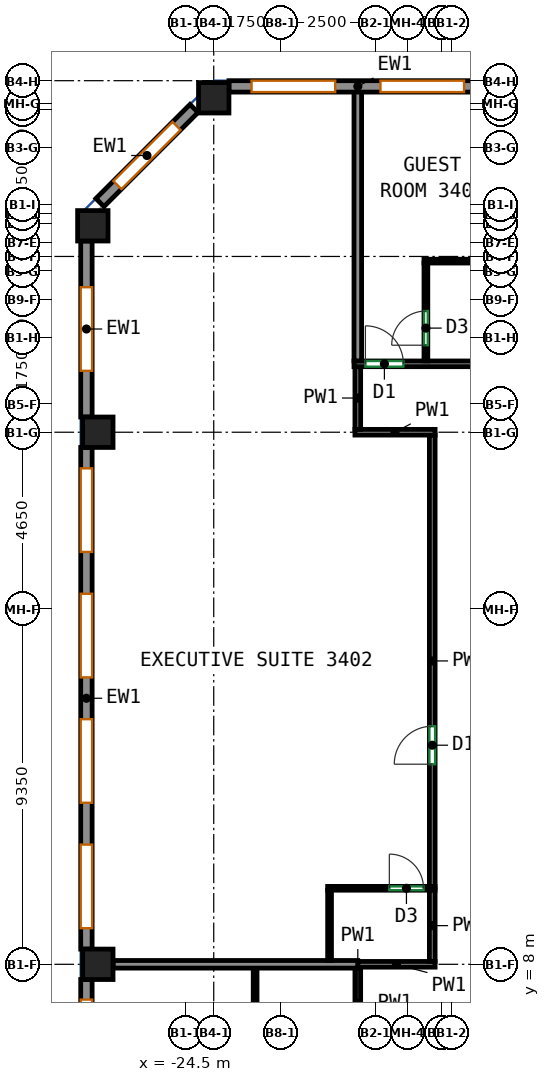
"""IFC4 building model, lengths in metres.
Left out: names, types, materials, properties, quantities, classifications, styles, units other than length and angle.
Written with IfcOpenShell. Run it as: python <this file> out.ifc"""

import sys

from ifc_helpers import new_model, si_unit, direction, frame, frame_2d, origin, origin_2d, place, context, subcontext, project, spatial, rectangle, extrude, source, transform, mapped, element, fill, save


model = new_model("IFC4")
c1 = context("Model", 3, precision=1e-05, world=origin(), true_north=direction((0.0, 1.0)))
c2 = subcontext(c1, "Body", "Model", "MODEL_VIEW")
j1 = project(units=[si_unit("LENGTHUNIT", "METRE"), si_unit("PLANEANGLEUNIT", "RADIAN")], contexts=[c1])
p1 = place(None, origin())
s1 = spatial("IfcSite", under=j1, at=p1, CompositionType="ELEMENT")
p2 = place(p1, origin())
s2 = spatial("IfcBuilding", under=s1, at=p2, CompositionType="ELEMENT")
p3 = place(p2, frame((0.0, 0.0, 150.7)))
s3 = spatial("IfcBuildingStorey", under=s2, at=p3, CompositionType="ELEMENT", Elevation=150.7)
m1 = source(origin(), c2, "Body", "SweptSolid", [
    extrude(rectangle(XDim=0.8, YDim=0.8, at=origin_2d()), origin(), (0.0, 0.0, 1.0), 3.12),
])
for number, where, z_axis, x_axis in (
    (1, (-26.932, 27.432, 0.0), (0.0, 0.0, 1.0), (1.0, 0.0, 0.0)),
    (2, (-26.8, 8.0, 0.0), (0.0, 0.0, 1.0), (1.0, 0.0, 0.0)),
    (3, (-26.8, 22.0, 0.0), (0.0, 0.0, 1.0), (1.0, 0.0, 0.0)),
    (4, (-23.75, 30.8, 0.0), (0.0, 0.0, 1.0), (1.0, 0.0, 0.0)),
):
    element("IfcColumn", number, at=place(p3, frame(where, z_axis=z_axis, x_axis=x_axis)), inside=s3, PredefinedType="COLUMN", context=c2, shape_type="MappedRepresentation", body=[
        mapped(m1, transform((0.0, 0.0, 0.0))),
    ])
m2 = source(origin(), c2, "Body", "SweptSolid", [
    extrude(rectangle(XDim=6.783, YDim=0.3, at=frame_2d((3.392, 0.0))), origin(), (0.0, 0.0, 1.0), 3.12),
])
p4 = place(p3, frame((-16.567, 31.1, 0.0), z_axis=(0.0, 0.0, 1.0), x_axis=(-1.0, 0.0, 0.0)))
e5 = element("IfcWall", 5, at=p4, inside=s3, PredefinedType="SOLIDWALL", context=c2, shape_type="MappedRepresentation", body=[
    mapped(m2, transform((0.0, 0.0, 0.0))),
])
p5 = place(p4, frame((0.596, 0.0, 0.85)))
e6 = element("IfcOpeningElement", 6, at=p5, cuts=e5, PredefinedType="OPENING", context=c2, shape_type="SweptSolid", body=[
    extrude(rectangle(XDim=2.2, YDim=1.95, at=frame_2d((1.1, 0.975))), frame((0.0, 0.16, 0.0), z_axis=(0.0, -1.0, 0.0), x_axis=(1.0, 0.0, 0.0)), (0.0, 0.0, 1.0), 0.32),
])
p6 = place(p4, frame((3.988, 0.0, 0.85)))
e7 = element("IfcOpeningElement", 7, at=p6, cuts=e5, PredefinedType="OPENING", context=c2, shape_type="SweptSolid", body=[
    extrude(rectangle(XDim=2.2, YDim=1.95, at=frame_2d((1.1, 0.975))), frame((0.0, 0.16, 0.0), z_axis=(0.0, -1.0, 0.0), x_axis=(1.0, 0.0, 0.0)), (0.0, 0.0, 1.0), 0.32),
])
m3 = source(origin(), c2, "Body", "SweptSolid", [
    extrude(rectangle(XDim=3.5, YDim=0.3, at=frame_2d((1.75, 0.0))), origin(), (0.0, 0.0, 1.0), 3.12),
])
p7 = place(p3, frame((-24.269, 30.519, 0.0), z_axis=(0.0, 0.0, 1.0), x_axis=(-0.707141656123, -0.70707190453, 0.0)))
e8 = element("IfcWall", 8, at=p7, inside=s3, PredefinedType="SOLIDWALL", context=c2, shape_type="MappedRepresentation", body=[
    mapped(m3, transform((0.0, 0.0, 0.0))),
])
p8 = place(p7, frame((0.65, 0.0, 0.85)))
e9 = element("IfcOpeningElement", 9, at=p8, cuts=e8, PredefinedType="OPENING", context=c2, shape_type="SweptSolid", body=[
    extrude(rectangle(XDim=2.2, YDim=1.95, at=frame_2d((1.1, 0.975))), frame((0.0, 0.16, 0.0), z_axis=(0.0, -1.0, 0.0), x_axis=(1.0, 0.0, 0.0)), (0.0, 0.0, 1.0), 0.32),
])
m4 = source(origin(), c2, "Body", "SweptSolid", [
    extrude(rectangle(XDim=4.632, YDim=0.3, at=frame_2d((2.316, 0.0))), origin(), (0.0, 0.0, 1.0), 3.12),
])
p9 = place(p3, frame((-27.1, 27.032, 0.0), z_axis=(0.0, 0.0, 1.0), x_axis=(0.0, -1.0, 0.0)))
e10 = element("IfcWall", 10, at=p9, inside=s3, PredefinedType="SOLIDWALL", context=c2, shape_type="MappedRepresentation", body=[
    mapped(m4, transform((0.0, 0.0, 0.0))),
])
p10 = place(p9, frame((1.216, 0.0, 0.85)))
e11 = element("IfcOpeningElement", 11, at=p10, cuts=e10, PredefinedType="OPENING", context=c2, shape_type="SweptSolid", body=[
    extrude(rectangle(XDim=2.2, YDim=1.95, at=frame_2d((1.1, 0.975))), frame((0.0, 0.16, 0.0), z_axis=(0.0, -1.0, 0.0), x_axis=(1.0, 0.0, 0.0)), (0.0, 0.0, 1.0), 0.32),
])
m5 = source(origin(), c2, "Body", "SweptSolid", [
    extrude(rectangle(XDim=13.2, YDim=0.3, at=frame_2d((6.6, 0.0))), origin(), (0.0, 0.0, 1.0), 3.12),
])
p11 = place(p3, frame((-27.1, 21.6, 0.0), z_axis=(0.0, 0.0, 1.0), x_axis=(0.0, -1.0, 0.0)))
e12 = element("IfcWall", 12, at=p11, inside=s3, PredefinedType="SOLIDWALL", context=c2, shape_type="MappedRepresentation", body=[
    mapped(m5, transform((0.0, 0.0, 0.0))),
])
p12 = place(p11, frame((0.55, 0.0, 0.85)))
e13 = element("IfcOpeningElement", 13, at=p12, cuts=e12, PredefinedType="OPENING", context=c2, shape_type="SweptSolid", body=[
    extrude(rectangle(XDim=2.2, YDim=1.95, at=frame_2d((1.1, 0.975))), frame((0.0, 0.16, 0.0), z_axis=(0.0, -1.0, 0.0), x_axis=(1.0, 0.0, 0.0)), (0.0, 0.0, 1.0), 0.32),
])
p13 = place(p11, frame((3.85, 0.0, 0.85)))
e14 = element("IfcOpeningElement", 14, at=p13, cuts=e12, PredefinedType="OPENING", context=c2, shape_type="SweptSolid", body=[
    extrude(rectangle(XDim=2.2, YDim=1.95, at=frame_2d((1.1, 0.975))), frame((0.0, 0.16, 0.0), z_axis=(0.0, -1.0, 0.0), x_axis=(1.0, 0.0, 0.0)), (0.0, 0.0, 1.0), 0.32),
])
p14 = place(p11, frame((7.15, 0.0, 0.85)))
e15 = element("IfcOpeningElement", 15, at=p14, cuts=e12, PredefinedType="OPENING", context=c2, shape_type="SweptSolid", body=[
    extrude(rectangle(XDim=2.2, YDim=1.95, at=frame_2d((1.1, 0.975))), frame((0.0, 0.16, 0.0), z_axis=(0.0, -1.0, 0.0), x_axis=(1.0, 0.0, 0.0)), (0.0, 0.0, 1.0), 0.32),
])
p15 = place(p11, frame((10.45, 0.0, 0.85)))
e16 = element("IfcOpeningElement", 16, at=p15, cuts=e12, PredefinedType="OPENING", context=c2, shape_type="SweptSolid", body=[
    extrude(rectangle(XDim=2.2, YDim=1.95, at=frame_2d((1.1, 0.975))), frame((0.0, 0.16, 0.0), z_axis=(0.0, -1.0, 0.0), x_axis=(1.0, 0.0, 0.0)), (0.0, 0.0, 1.0), 0.32),
])
m6 = source(origin(), c2, "Body", "SweptSolid", [
    extrude(rectangle(XDim=6.513, YDim=0.3, at=frame_2d((3.256, 0.0))), origin(), (0.0, 0.0, 1.0), 3.12),
])
p16 = place(p3, frame((-27.1, 7.6, 0.0), z_axis=(0.0, 0.0, 1.0), x_axis=(0.0, -1.0, 0.0)))
e17 = element("IfcWall", 17, at=p16, inside=s3, PredefinedType="SOLIDWALL", context=c2, shape_type="MappedRepresentation", body=[
    mapped(m6, transform((0.0, 0.0, 0.0))),
])
p17 = place(p16, frame((0.528, 0.0, 0.85)))
e18 = element("IfcOpeningElement", 18, at=p17, cuts=e17, PredefinedType="OPENING", context=c2, shape_type="SweptSolid", body=[
    extrude(rectangle(XDim=2.2, YDim=1.95, at=frame_2d((1.1, 0.975))), frame((0.0, 0.16, 0.0), z_axis=(0.0, -1.0, 0.0), x_axis=(1.0, 0.0, 0.0)), (0.0, 0.0, 1.0), 0.32),
])
p18 = place(p16, frame((3.784, 0.0, 0.85)))
e19 = element("IfcOpeningElement", 19, at=p18, cuts=e17, PredefinedType="OPENING", context=c2, shape_type="SweptSolid", body=[
    extrude(rectangle(XDim=2.2, YDim=1.95, at=frame_2d((1.1, 0.975))), frame((0.0, 0.16, 0.0), z_axis=(0.0, -1.0, 0.0), x_axis=(1.0, 0.0, 0.0)), (0.0, 0.0, 1.0), 0.32),
])
p19 = place(p3, frame((-19.959, 6.04, 0.0), z_axis=(0.0, 0.0, 1.0), x_axis=(0.0, 1.0, 0.0)))
e20 = element("IfcWall", 20, at=p19, inside=s3, PredefinedType="PARTITIONING", context=c2, shape_type="SweptSolid", body=[
    extrude(rectangle(XDim=1.86, YDim=0.15, at=frame_2d((0.93, 0.0))), origin(), (0.0, 0.0, 1.0), 3.12),
])
p20 = place(p3, frame((-18.0, 10.04, 0.0), z_axis=(0.0, 0.0, 1.0), x_axis=(0.0, 1.0, 0.0)))
e21 = element("IfcWall", 21, at=p20, inside=s3, PredefinedType="PARTITIONING", context=c2, shape_type="SweptSolid", body=[
    extrude(rectangle(XDim=11.885, YDim=0.15, at=frame_2d((5.942, 0.0))), origin(), (0.0, 0.0, 1.0), 3.12),
])
p21 = place(p20, frame((3.225, 0.0, 0.0)))
e22 = element("IfcOpeningElement", 22, at=p21, cuts=e21, PredefinedType="OPENING", context=c2, shape_type="SweptSolid", body=[
    extrude(rectangle(XDim=1.0, YDim=2.1, at=frame_2d((0.5, 1.05))), frame((0.0, 0.085, 0.0), z_axis=(0.0, -1.0, 0.0), x_axis=(1.0, 0.0, 0.0)), (0.0, 0.0, 1.0), 0.17),
])
p22 = place(p3, frame((-20.034, 22.0, 0.0), z_axis=(0.0, 0.0, 1.0), x_axis=(1.0, 0.0, 0.0)))
e23 = element("IfcWall", 23, at=p22, inside=s3, PredefinedType="PARTITIONING", context=c2, shape_type="SweptSolid", body=[
    extrude(rectangle(XDim=2.109, YDim=0.15, at=frame_2d((1.054, 0.0))), origin(), (0.0, 0.0, 1.0), 3.12),
])
p23 = place(p3, frame((-19.959, 22.075, 0.0), z_axis=(0.0, 0.0, 1.0), x_axis=(0.0, 1.0, 0.0)))
e24 = element("IfcWall", 24, at=p23, inside=s3, PredefinedType="PARTITIONING", context=c2, shape_type="SweptSolid", body=[
    extrude(rectangle(XDim=1.65, YDim=0.15, at=frame_2d((0.825, 0.0))), origin(), (0.0, 0.0, 1.0), 3.12),
])
p24 = place(p3, frame((-17.925, 8.0, 0.0), z_axis=(0.0, 0.0, 1.0), x_axis=(-1.0, 0.0, 0.0)))
e25 = element("IfcWall", 25, at=p24, inside=s3, PredefinedType="PARTITIONING", context=c2, shape_type="SweptSolid", body=[
    extrude(rectangle(XDim=2.034, YDim=0.15, at=frame_2d((1.017, 0.0))), origin(), (0.0, 0.0, 1.0), 3.12),
])
p25 = place(p3, frame((-18.0, 8.075, 0.0), z_axis=(0.0, 0.0, 1.0), x_axis=(0.0, 1.0, 0.0)))
e26 = element("IfcWall", 26, at=p25, inside=s3, PredefinedType="PARTITIONING", context=c2, shape_type="SweptSolid", body=[
    extrude(rectangle(XDim=1.885, YDim=0.15, at=frame_2d((0.942, 0.0))), origin(), (0.0, 0.0, 1.0), 3.12),
])
p26 = place(p3, frame((-20.059, 23.8, 0.0), z_axis=(0.0, 0.0, 1.0), x_axis=(1.0, 0.0, 0.0)))
e27 = element("IfcWall", 27, at=p26, inside=s3, PredefinedType="PARTITIONING", context=c2, shape_type="SweptSolid", body=[
    extrude(rectangle(XDim=41.909, YDim=0.15, at=frame_2d((20.955, 0.0))), origin(), (0.0, 0.0, 1.0), 3.12),
])
p27 = place(p26, frame((0.3, 0.0, 0.0)))
e28 = element("IfcOpeningElement", 28, at=p27, cuts=e27, PredefinedType="OPENING", context=c2, shape_type="SweptSolid", body=[
    extrude(rectangle(XDim=1.0, YDim=2.1, at=frame_2d((0.5, 1.05))), frame((0.0, 0.085, 0.0), z_axis=(0.0, -1.0, 0.0), x_axis=(1.0, 0.0, 0.0)), (0.0, 0.0, 1.0), 0.17),
])
p28 = place(p26, frame((6.391, 0.0, 0.0)))
e29 = element("IfcOpeningElement", 29, at=p28, cuts=e27, PredefinedType="OPENING", context=c2, shape_type="SweptSolid", body=[
    extrude(rectangle(XDim=1.0, YDim=2.1, at=frame_2d((0.5, 1.05))), frame((0.0, 0.085, 0.0), z_axis=(0.0, -1.0, 0.0), x_axis=(1.0, 0.0, 0.0)), (0.0, 0.0, 1.0), 0.17),
])
p29 = place(p26, frame((8.183, 0.0, 0.0)))
e30 = element("IfcOpeningElement", 30, at=p29, cuts=e27, PredefinedType="OPENING", context=c2, shape_type="SweptSolid", body=[
    extrude(rectangle(XDim=1.0, YDim=2.1, at=frame_2d((0.5, 1.05))), frame((0.0, 0.085, 0.0), z_axis=(0.0, -1.0, 0.0), x_axis=(1.0, 0.0, 0.0)), (0.0, 0.0, 1.0), 0.17),
])
p30 = place(p26, frame((13.872, 0.0, 0.0)))
e31 = element("IfcOpeningElement", 31, at=p30, cuts=e27, PredefinedType="OPENING", context=c2, shape_type="SweptSolid", body=[
    extrude(rectangle(XDim=1.0, YDim=2.1, at=frame_2d((0.5, 1.05))), frame((0.0, 0.085, 0.0), z_axis=(0.0, -1.0, 0.0), x_axis=(1.0, 0.0, 0.0)), (0.0, 0.0, 1.0), 0.17),
])
p31 = place(p26, frame((15.457, 0.0, 0.0)))
e32 = element("IfcOpeningElement", 32, at=p31, cuts=e27, PredefinedType="OPENING", context=c2, shape_type="SweptSolid", body=[
    extrude(rectangle(XDim=1.0, YDim=2.1, at=frame_2d((0.5, 1.05))), frame((0.0, 0.085, 0.0), z_axis=(0.0, -1.0, 0.0), x_axis=(1.0, 0.0, 0.0)), (0.0, 0.0, 1.0), 0.17),
])
p32 = place(p26, frame((21.199, 0.0, 0.0)))
e33 = element("IfcOpeningElement", 33, at=p32, cuts=e27, PredefinedType="OPENING", context=c2, shape_type="SweptSolid", body=[
    extrude(rectangle(XDim=1.0, YDim=2.1, at=frame_2d((0.5, 1.05))), frame((0.0, 0.085, 0.0), z_axis=(0.0, -1.0, 0.0), x_axis=(1.0, 0.0, 0.0)), (0.0, 0.0, 1.0), 0.17),
])
p33 = place(p26, frame((23.212, 0.0, 0.0)))
e34 = element("IfcOpeningElement", 34, at=p33, cuts=e27, PredefinedType="OPENING", context=c2, shape_type="SweptSolid", body=[
    extrude(rectangle(XDim=1.0, YDim=2.1, at=frame_2d((0.5, 1.05))), frame((0.0, 0.085, 0.0), z_axis=(0.0, -1.0, 0.0), x_axis=(1.0, 0.0, 0.0)), (0.0, 0.0, 1.0), 0.17),
])
p34 = place(p26, frame((28.832, 0.0, 0.0)))
e35 = element("IfcOpeningElement", 35, at=p34, cuts=e27, PredefinedType="OPENING", context=c2, shape_type="SweptSolid", body=[
    extrude(rectangle(XDim=1.0, YDim=2.1, at=frame_2d((0.5, 1.05))), frame((0.0, 0.085, 0.0), z_axis=(0.0, -1.0, 0.0), x_axis=(1.0, 0.0, 0.0)), (0.0, 0.0, 1.0), 0.17),
])
p35 = place(p26, frame((30.83, 0.0, 0.0)))
e36 = element("IfcOpeningElement", 36, at=p35, cuts=e27, PredefinedType="OPENING", context=c2, shape_type="SweptSolid", body=[
    extrude(rectangle(XDim=1.0, YDim=2.1, at=frame_2d((0.5, 1.05))), frame((0.0, 0.085, 0.0), z_axis=(0.0, -1.0, 0.0), x_axis=(1.0, 0.0, 0.0)), (0.0, 0.0, 1.0), 0.17),
])
p36 = place(p26, frame((36.519, 0.0, 0.0)))
e37 = element("IfcOpeningElement", 37, at=p36, cuts=e27, PredefinedType="OPENING", context=c2, shape_type="SweptSolid", body=[
    extrude(rectangle(XDim=1.0, YDim=2.1, at=frame_2d((0.5, 1.05))), frame((0.0, 0.085, 0.0), z_axis=(0.0, -1.0, 0.0), x_axis=(1.0, 0.0, 0.0)), (0.0, 0.0, 1.0), 0.17),
])
p37 = place(p26, frame((38.311, 0.0, 0.0)))
e38 = element("IfcOpeningElement", 38, at=p37, cuts=e27, PredefinedType="OPENING", context=c2, shape_type="SweptSolid", body=[
    extrude(rectangle(XDim=1.0, YDim=2.1, at=frame_2d((0.5, 1.05))), frame((0.0, 0.085, 0.0), z_axis=(0.0, -1.0, 0.0), x_axis=(1.0, 0.0, 0.0)), (0.0, 0.0, 1.0), 0.17),
])
p38 = place(p3, frame((-22.661, 6.05, 0.0), z_axis=(0.0, 0.0, 1.0), x_axis=(0.0, 1.0, 0.0)))
e39 = element("IfcWall", 39, at=p38, inside=s3, PredefinedType="PARTITIONING", context=c2, shape_type="SweptSolid", body=[
    extrude(rectangle(XDim=1.85, YDim=0.1, at=frame_2d((0.925, 0.0))), origin(), (0.0, 0.0, 1.0), 3.12),
])
p39 = place(p3, frame((-26.4, 8.0, 0.0), z_axis=(0.0, 0.0, 1.0), x_axis=(1.0, 0.0, 0.0)))
e40 = element("IfcWall", 40, at=p39, inside=s3, PredefinedType="PARTITIONING", context=c2, shape_type="SweptSolid", body=[
    extrude(rectangle(XDim=6.439, YDim=0.2, at=frame_2d((3.219, 0.0))), origin(), (0.0, 0.0, 1.0), 3.12),
])
p40 = place(p3, frame((-20.752, 10.0, 0.0), z_axis=(0.0, 0.0, 1.0), x_axis=(1.0, 0.0, 0.0)))
e41 = element("IfcWall", 41, at=p40, inside=s3, PredefinedType="PARTITIONING", context=c2, shape_type="SweptSolid", body=[
    extrude(rectangle(XDim=2.825, YDim=0.1, at=frame_2d((1.413, 0.0))), origin(), (0.0, 0.0, 1.0), 3.12),
])
p41 = place(p40, frame((1.623, 0.0, 0.0)))
e42 = element("IfcOpeningElement", 42, at=p41, cuts=e41, PredefinedType="OPENING", context=c2, shape_type="SweptSolid", body=[
    extrude(rectangle(XDim=0.9, YDim=2.1, at=frame_2d((0.45, 1.05))), frame((0.0, 0.06, 0.0), z_axis=(0.0, -1.0, 0.0), x_axis=(1.0, 0.0, 0.0)), (0.0, 0.0, 1.0), 0.12),
])
p42 = place(p3, frame((-20.702, 8.1, 0.0), z_axis=(0.0, 0.0, 1.0), x_axis=(0.0, 1.0, 0.0)))
e43 = element("IfcWall", 43, at=p42, inside=s3, PredefinedType="PARTITIONING", context=c2, shape_type="SweptSolid", body=[
    extrude(rectangle(XDim=1.85, YDim=0.1, at=frame_2d((0.925, 0.0))), origin(), (0.0, 0.0, 1.0), 3.12),
])
p43 = place(p3, frame((-19.959, 23.877, 0.0), z_axis=(0.0, 0.0, 1.0), x_axis=(0.0, 1.0, 0.0)))
e44 = element("IfcWall", 44, at=p43, inside=s3, PredefinedType="PARTITIONING", context=c2, shape_type="SweptSolid", body=[
    extrude(rectangle(XDim=7.123, YDim=0.2, at=frame_2d((3.562, 0.0))), origin(), (0.0, 0.0, 1.0), 3.12),
])
p44 = place(p3, frame((-18.217, 26.502, 0.0), z_axis=(0.0, 0.0, 1.0), x_axis=(1.0, 0.0, 0.0)))
e45 = element("IfcWall", 45, at=p44, inside=s3, PredefinedType="PARTITIONING", context=c2, shape_type="SweptSolid", body=[
    extrude(rectangle(XDim=1.5, YDim=0.1, at=frame_2d((0.75, 0.0))), origin(), (0.0, 0.0, 1.0), 3.12),
])
p45 = place(p3, frame((-18.167, 23.877, 0.0), z_axis=(0.0, 0.0, 1.0), x_axis=(0.0, 1.0, 0.0)))
e46 = element("IfcWall", 46, at=p45, inside=s3, PredefinedType="PARTITIONING", context=c2, shape_type="SweptSolid", body=[
    extrude(rectangle(XDim=2.575, YDim=0.1, at=frame_2d((1.288, 0.0))), origin(), (0.0, 0.0, 1.0), 3.12),
])
p46 = place(p45, frame((0.413, 0.0, 0.0)))
e47 = element("IfcOpeningElement", 47, at=p46, cuts=e46, PredefinedType="OPENING", context=c2, shape_type="SweptSolid", body=[
    extrude(rectangle(XDim=0.9, YDim=2.1, at=frame_2d((0.45, 1.05))), frame((0.0, 0.06, 0.0), z_axis=(0.0, -1.0, 0.0), x_axis=(1.0, 0.0, 0.0)), (0.0, 0.0, 1.0), 0.12),
])
p47 = place(p5, origin())
e48 = element("IfcWindow", 48, at=p47, inside=s3, PartitioningType="SINGLE_PANEL", PredefinedType="WINDOW", context=c2, shape_type="SweptSolid", body=[
    extrude(rectangle(XDim=2.2, YDim=1.95, at=frame_2d((1.1, 0.975))), frame((0.0, 0.03, 0.0), z_axis=(0.0, -1.0, 0.0), x_axis=(1.0, 0.0, 0.0)), (0.0, 0.0, 1.0), 0.06),
])
fill(e6, e48)
p48 = place(p6, origin())
e49 = element("IfcWindow", 49, at=p48, inside=s3, PartitioningType="SINGLE_PANEL", PredefinedType="WINDOW", context=c2, shape_type="SweptSolid", body=[
    extrude(rectangle(XDim=2.2, YDim=1.95, at=frame_2d((1.1, 0.975))), frame((0.0, 0.03, 0.0), z_axis=(0.0, -1.0, 0.0), x_axis=(1.0, 0.0, 0.0)), (0.0, 0.0, 1.0), 0.06),
])
fill(e7, e49)
p49 = place(p8, origin())
e50 = element("IfcWindow", 50, at=p49, inside=s3, PartitioningType="SINGLE_PANEL", PredefinedType="WINDOW", context=c2, shape_type="SweptSolid", body=[
    extrude(rectangle(XDim=2.2, YDim=1.95, at=frame_2d((1.1, 0.975))), frame((0.0, 0.03, 0.0), z_axis=(0.0, -1.0, 0.0), x_axis=(1.0, 0.0, 0.0)), (0.0, 0.0, 1.0), 0.06),
])
fill(e9, e50)
p50 = place(p10, origin())
e51 = element("IfcWindow", 51, at=p50, inside=s3, PartitioningType="SINGLE_PANEL", PredefinedType="WINDOW", context=c2, shape_type="SweptSolid", body=[
    extrude(rectangle(XDim=2.2, YDim=1.95, at=frame_2d((1.1, 0.975))), frame((0.0, 0.03, 0.0), z_axis=(0.0, -1.0, 0.0), x_axis=(1.0, 0.0, 0.0)), (0.0, 0.0, 1.0), 0.06),
])
fill(e11, e51)
p51 = place(p12, origin())
e52 = element("IfcWindow", 52, at=p51, inside=s3, PartitioningType="SINGLE_PANEL", PredefinedType="WINDOW", context=c2, shape_type="SweptSolid", body=[
    extrude(rectangle(XDim=2.2, YDim=1.95, at=frame_2d((1.1, 0.975))), frame((0.0, 0.03, 0.0), z_axis=(0.0, -1.0, 0.0), x_axis=(1.0, 0.0, 0.0)), (0.0, 0.0, 1.0), 0.06),
])
fill(e13, e52)
p52 = place(p13, origin())
e53 = element("IfcWindow", 53, at=p52, inside=s3, PartitioningType="SINGLE_PANEL", PredefinedType="WINDOW", context=c2, shape_type="SweptSolid", body=[
    extrude(rectangle(XDim=2.2, YDim=1.95, at=frame_2d((1.1, 0.975))), frame((0.0, 0.03, 0.0), z_axis=(0.0, -1.0, 0.0), x_axis=(1.0, 0.0, 0.0)), (0.0, 0.0, 1.0), 0.06),
])
fill(e14, e53)
p53 = place(p14, origin())
e54 = element("IfcWindow", 54, at=p53, inside=s3, PartitioningType="SINGLE_PANEL", PredefinedType="WINDOW", context=c2, shape_type="SweptSolid", body=[
    extrude(rectangle(XDim=2.2, YDim=1.95, at=frame_2d((1.1, 0.975))), frame((0.0, 0.03, 0.0), z_axis=(0.0, -1.0, 0.0), x_axis=(1.0, 0.0, 0.0)), (0.0, 0.0, 1.0), 0.06),
])
fill(e15, e54)
p54 = place(p15, origin())
e55 = element("IfcWindow", 55, at=p54, inside=s3, PartitioningType="SINGLE_PANEL", PredefinedType="WINDOW", context=c2, shape_type="SweptSolid", body=[
    extrude(rectangle(XDim=2.2, YDim=1.95, at=frame_2d((1.1, 0.975))), frame((0.0, 0.03, 0.0), z_axis=(0.0, -1.0, 0.0), x_axis=(1.0, 0.0, 0.0)), (0.0, 0.0, 1.0), 0.06),
])
fill(e16, e55)
p55 = place(p17, origin())
e56 = element("IfcWindow", 56, at=p55, inside=s3, PartitioningType="SINGLE_PANEL", PredefinedType="WINDOW", context=c2, shape_type="SweptSolid", body=[
    extrude(rectangle(XDim=2.2, YDim=1.95, at=frame_2d((1.1, 0.975))), frame((0.0, 0.03, 0.0), z_axis=(0.0, -1.0, 0.0), x_axis=(1.0, 0.0, 0.0)), (0.0, 0.0, 1.0), 0.06),
])
fill(e18, e56)
p56 = place(p41, origin())
e57 = element("IfcDoor", 57, at=p56, inside=s3, OperationType="SINGLE_SWING_LEFT", PredefinedType="DOOR", context=c2, shape_type="SweptSolid", body=[
    extrude(rectangle(XDim=0.9, YDim=2.1, at=frame_2d((0.45, 1.05))), frame((0.0, 0.025, 0.0), z_axis=(0.0, -1.0, 0.0), x_axis=(1.0, 0.0, 0.0)), (0.0, 0.0, 1.0), 0.05),
])
fill(e42, e57)
p57 = place(p21, origin())
e58 = element("IfcDoor", 58, at=p57, inside=s3, OperationType="SINGLE_SWING_LEFT", PredefinedType="DOOR", context=c2, shape_type="SweptSolid", body=[
    extrude(rectangle(XDim=1.0, YDim=2.1, at=frame_2d((0.5, 1.05))), frame((0.0, 0.025, 0.0), z_axis=(0.0, -1.0, 0.0), x_axis=(1.0, 0.0, 0.0)), (0.0, 0.0, 1.0), 0.05),
])
fill(e22, e58)
p58 = place(p27, origin())
e59 = element("IfcDoor", 59, at=p58, inside=s3, OperationType="SINGLE_SWING_LEFT", PredefinedType="DOOR", context=c2, shape_type="SweptSolid", body=[
    extrude(rectangle(XDim=1.0, YDim=2.1, at=frame_2d((0.5, 1.05))), frame((0.0, 0.025, 0.0), z_axis=(0.0, -1.0, 0.0), x_axis=(1.0, 0.0, 0.0)), (0.0, 0.0, 1.0), 0.05),
])
fill(e28, e59)
p59 = place(p46, origin())
e60 = element("IfcDoor", 60, at=p59, inside=s3, OperationType="SINGLE_SWING_LEFT", PredefinedType="DOOR", context=c2, shape_type="SweptSolid", body=[
    extrude(rectangle(XDim=0.9, YDim=2.1, at=frame_2d((0.45, 1.05))), frame((0.0, 0.025, 0.0), z_axis=(0.0, -1.0, 0.0), x_axis=(1.0, 0.0, 0.0)), (0.0, 0.0, 1.0), 0.05),
])
fill(e47, e60)
save(model, sys.argv[1])
